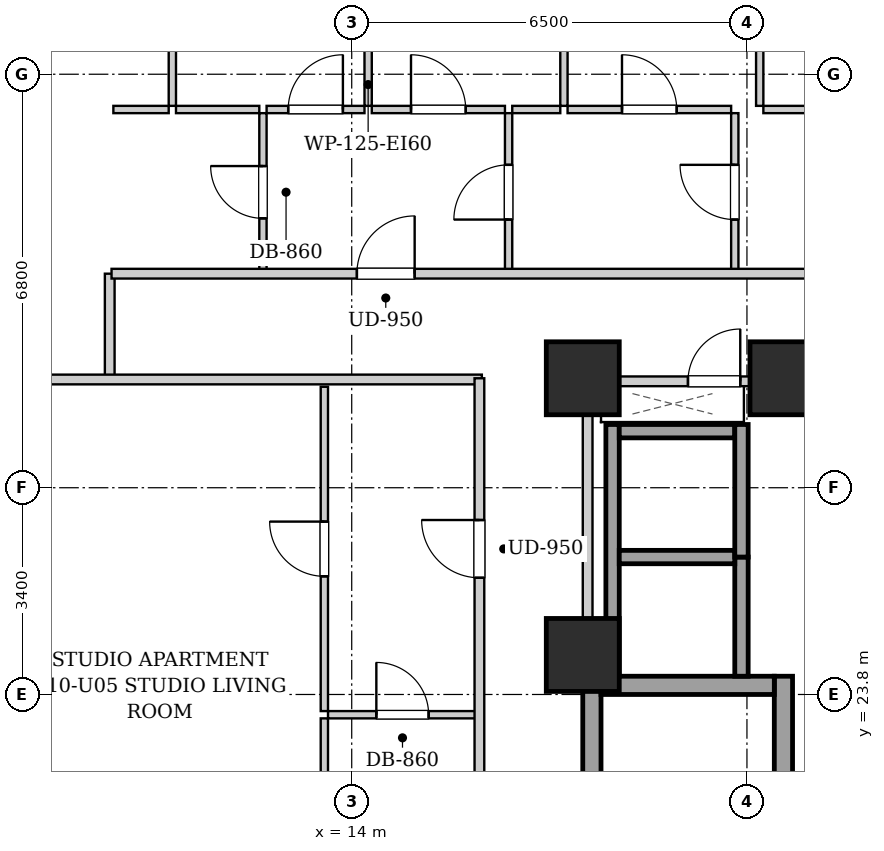
"""IFC4 building model, lengths in metres.
Left out: names, types, materials, properties, quantities, classifications, styles, units other than length and angle.
Written with IfcOpenShell. Run it as: python <this file> out.ifc"""

import sys

from ifc_helpers import new_model, si_unit, direction, frame, frame_2d, origin, origin_2d, place, context, subcontext, project, spatial, rectangle, extrude, element, fill, save


model = new_model("IFC4")
c1 = context("Model", 3, precision=1e-05, world=origin(), true_north=direction((0.0, 1.0)))
c2 = subcontext(c1, "Body", "Model", "MODEL_VIEW")
j1 = project(units=[si_unit("LENGTHUNIT", "METRE"), si_unit("PLANEANGLEUNIT", "RADIAN")], contexts=[c1])
p1 = place(None, origin())
s1 = spatial("IfcSite", under=j1, at=p1, CompositionType="ELEMENT")
p2 = place(p1, origin())
s2 = spatial("IfcBuilding", under=s1, at=p2, CompositionType="ELEMENT")
p3 = place(p2, frame((0.0, 0.0, 41.8)))
s3 = spatial("IfcBuildingStorey", under=s2, at=p3, CompositionType="ELEMENT", Elevation=41.8)
for number, where, z_axis, x_axis in (
    (1, (17.8, 29.0, 0.0), (0.0, 0.0, 1.0), (1.0, 0.0, 0.0)),
    (2, (21.15, 29.0, 0.0), (0.0, 0.0, 1.0), (1.0, 0.0, 0.0)),
    (3, (17.8, 24.45, 0.0), (0.0, 0.0, 1.0), (1.0, 0.0, 0.0)),
):
    element("IfcColumn", number, at=place(p3, frame(where, z_axis=z_axis, x_axis=x_axis)), inside=s3, PredefinedType="COLUMN", context=c2, shape_type="SweptSolid", body=[
        extrude(rectangle(XDim=1.2, YDim=1.2, at=origin_2d()), origin(), (0.0, 0.0, 1.0), 3.2),
    ])
for number, where, z_axis, x_axis in (
    (4, (17.95, 15.1, 0.0), (0.0, 0.0, 1.0), (0.0, 1.0, 0.0)),
    (5, (21.1, 15.1, 0.0), (0.0, 0.0, 1.0), (0.0, 1.0, 0.0)),
):
    element("IfcWall", number, at=place(p3, frame(where, z_axis=z_axis, x_axis=x_axis)), inside=s3, PredefinedType="SHEAR", context=c2, shape_type="SweptSolid", body=[
        extrude(rectangle(XDim=9.0, YDim=0.3, at=frame_2d((4.5, 0.0))), origin(), (0.0, 0.0, 1.0), 2.94),
    ])
p4 = place(p3, frame((18.1, 23.95, 0.0), z_axis=(0.0, 0.0, 1.0), x_axis=(1.0, 0.0, 0.0)))
e6 = element("IfcWall", 6, at=p4, inside=s3, PredefinedType="SHEAR", context=c2, shape_type="SweptSolid", body=[
    extrude(rectangle(XDim=2.85, YDim=0.3, at=frame_2d((1.425, 0.0))), origin(), (0.0, 0.0, 1.0), 2.94),
])
p5 = place(p3, frame((18.29, 24.1, 0.0), z_axis=(0.0, 0.0, 1.0), x_axis=(0.0, 1.0, 0.0)))
e7 = element("IfcWall", 7, at=p5, inside=s3, PredefinedType="SHEAR", context=c2, shape_type="SweptSolid", body=[
    extrude(rectangle(XDim=4.14, YDim=0.22, at=frame_2d((2.07, 0.0))), origin(), (0.0, 0.0, 1.0), 2.94),
])
p6 = place(p3, frame((20.41, 24.1, 0.0), z_axis=(0.0, 0.0, 1.0), x_axis=(0.0, 1.0, 0.0)))
e8 = element("IfcWall", 8, at=p6, inside=s3, PredefinedType="SHEAR", context=c2, shape_type="SweptSolid", body=[
    extrude(rectangle(XDim=1.96, YDim=0.22, at=frame_2d((0.98, 0.0))), origin(), (0.0, 0.0, 1.0), 2.94),
])
for number, where, z_axis, x_axis in (
    (9, (18.4, 26.06, 0.0), (0.0, 0.0, 1.0), (1.0, 0.0, 0.0)),
    (10, (18.4, 28.13, 0.0), (0.0, 0.0, 1.0), (1.0, 0.0, 0.0)),
):
    element("IfcWall", number, at=place(p3, frame(where, z_axis=z_axis, x_axis=x_axis)), inside=s3, PredefinedType="SHEAR", context=c2, shape_type="SweptSolid", body=[
        extrude(rectangle(XDim=1.9, YDim=0.22, at=frame_2d((0.95, 0.0))), origin(), (0.0, 0.0, 1.0), 2.94),
    ])
p7 = place(p3, frame((20.41, 26.06, 0.0), z_axis=(0.0, 0.0, 1.0), x_axis=(0.0, 1.0, 0.0)))
e11 = element("IfcWall", 11, at=p7, inside=s3, PredefinedType="SHEAR", context=c2, shape_type="SweptSolid", body=[
    extrude(rectangle(XDim=2.18, YDim=0.22, at=frame_2d((1.09, 0.0))), origin(), (0.0, 0.0, 1.0), 2.94),
])
p8 = place(p3, frame((17.88, 24.12, 0.0), z_axis=(0.0, 0.0, 1.0), x_axis=(0.0, 1.0, 0.0)))
e12 = element("IfcWall", 12, at=p8, inside=s3, PredefinedType="PARTITIONING", context=c2, shape_type="SweptSolid", body=[
    extrude(rectangle(XDim=4.76, YDim=0.16, at=frame_2d((2.38, 0.0))), origin(), (0.0, 0.0, 1.0), 2.94),
])
p9 = place(p3, frame((17.96, 28.95, 0.0), z_axis=(0.0, 0.0, 1.0), x_axis=(1.0, 0.0, 0.0)))
e13 = element("IfcWall", 13, at=p9, inside=s3, PredefinedType="PARTITIONING", context=c2, shape_type="SweptSolid", body=[
    extrude(rectangle(XDim=4.29, YDim=0.16, at=frame_2d((2.145, 0.0))), origin(), (0.0, 0.0, 1.0), 2.155),
])
p10 = place(p9, frame((1.57, 0.0, 0.0)))
e14 = element("IfcOpeningElement", 14, at=p10, cuts=e13, PredefinedType="OPENING", context=c2, shape_type="SweptSolid", body=[
    extrude(rectangle(XDim=0.86, YDim=2.05, at=frame_2d((0.43, 1.025))), frame((0.0, 0.09, 0.0), z_axis=(0.0, -1.0, 0.0), x_axis=(1.0, 0.0, 0.0)), (0.0, 0.0, 1.0), 0.18),
])
p11 = place(p3, frame((10.02, 28.98, 0.0), z_axis=(0.0, 0.0, 1.0), x_axis=(0.0, 1.0, 0.0)))
e15 = element("IfcWall", 15, at=p11, inside=s3, PredefinedType="PARTITIONING", context=c2, shape_type="SweptSolid", body=[
    extrude(rectangle(XDim=1.74, YDim=0.16, at=frame_2d((0.87, 0.0))), origin(), (0.0, 0.0, 1.0), 2.94),
])
p12 = place(p3, frame((7.78, 28.98, 0.0), z_axis=(0.0, 0.0, 1.0), x_axis=(1.0, 0.0, 0.0)))
e16 = element("IfcWall", 16, at=p12, inside=s3, PredefinedType="PARTITIONING", context=c2, shape_type="SweptSolid", body=[
    extrude(rectangle(XDim=8.36, YDim=0.16, at=frame_2d((4.18, 0.0))), origin(), (0.0, 0.0, 1.0), 2.155),
])
p13 = place(p3, frame((12.54, 30.76, 0.0), z_axis=(0.0, 0.0, 1.0), x_axis=(0.0, 1.0, 0.0)))
e17 = element("IfcWall", 17, at=p13, inside=s3, PredefinedType="PARTITIONING", context=c2, shape_type="SweptSolid", body=[
    extrude(rectangle(XDim=2.6, YDim=0.12, at=frame_2d((1.3, 0.0))), origin(), (0.0, 0.0, 1.0), 2.94),
])
p14 = place(p13, frame((0.87, 0.0, 0.0)))
e18 = element("IfcOpeningElement", 18, at=p14, cuts=e17, PredefinedType="OPENING", context=c2, shape_type="SweptSolid", body=[
    extrude(rectangle(XDim=0.86, YDim=2.05, at=frame_2d((0.43, 1.025))), frame((0.0, 0.07, 0.0), z_axis=(0.0, -1.0, 0.0), x_axis=(1.0, 0.0, 0.0)), (0.0, 0.0, 1.0), 0.14),
])
p15 = place(p3, frame((10.08, 33.42, 0.0), z_axis=(0.0, 0.0, 1.0), x_axis=(1.0, 0.0, 0.0)))
e19 = element("IfcWall", 19, at=p15, inside=s3, PredefinedType="PARTITIONING", context=c2, shape_type="SweptSolid", body=[
    extrude(rectangle(XDim=0.91, YDim=0.12, at=frame_2d((0.455, 0.0))), origin(), (0.0, 0.0, 1.0), 2.94),
])
p16 = place(p3, frame((11.11, 33.42, 0.0), z_axis=(0.0, 0.0, 1.0), x_axis=(1.0, 0.0, 0.0)))
e20 = element("IfcWall", 20, at=p16, inside=s3, PredefinedType="PARTITIONING", context=c2, shape_type="SweptSolid", body=[
    extrude(rectangle(XDim=1.37, YDim=0.12, at=frame_2d((0.685, 0.0))), origin(), (0.0, 0.0, 1.0), 2.94),
])
p17 = place(p3, frame((16.58, 30.76, 0.0), z_axis=(0.0, 0.0, 1.0), x_axis=(0.0, 1.0, 0.0)))
e21 = element("IfcWall", 21, at=p17, inside=s3, PredefinedType="PARTITIONING", context=c2, shape_type="SweptSolid", body=[
    extrude(rectangle(XDim=2.6, YDim=0.12, at=frame_2d((1.3, 0.0))), origin(), (0.0, 0.0, 1.0), 2.94),
])
p18 = place(p17, frame((0.85, 0.0, 0.0)))
e22 = element("IfcOpeningElement", 22, at=p18, cuts=e21, PredefinedType="OPENING", context=c2, shape_type="SweptSolid", body=[
    extrude(rectangle(XDim=0.9, YDim=2.05, at=frame_2d((0.45, 1.025))), frame((0.0, 0.07, 0.0), z_axis=(0.0, -1.0, 0.0), x_axis=(1.0, 0.0, 0.0)), (0.0, 0.0, 1.0), 0.14),
])
p19 = place(p3, frame((12.6, 33.42, 0.0), z_axis=(0.0, 0.0, 1.0), x_axis=(1.0, 0.0, 0.0)))
e23 = element("IfcWall", 23, at=p19, inside=s3, PredefinedType="PARTITIONING", context=c2, shape_type="SweptSolid", body=[
    extrude(rectangle(XDim=1.61, YDim=0.12, at=frame_2d((0.805, 0.0))), origin(), (0.0, 0.0, 1.0), 2.94),
])
p20 = place(p19, frame((0.355, 0.0, 0.0)))
e24 = element("IfcOpeningElement", 24, at=p20, cuts=e23, PredefinedType="OPENING", context=c2, shape_type="SweptSolid", body=[
    extrude(rectangle(XDim=0.9, YDim=2.05, at=frame_2d((0.45, 1.025))), frame((0.0, 0.07, 0.0), z_axis=(0.0, -1.0, 0.0), x_axis=(1.0, 0.0, 0.0)), (0.0, 0.0, 1.0), 0.14),
])
p21 = place(p3, frame((14.33, 33.42, 0.0), z_axis=(0.0, 0.0, 1.0), x_axis=(1.0, 0.0, 0.0)))
e25 = element("IfcWall", 25, at=p21, inside=s3, PredefinedType="PARTITIONING", context=c2, shape_type="SweptSolid", body=[
    extrude(rectangle(XDim=2.19, YDim=0.12, at=frame_2d((1.095, 0.0))), origin(), (0.0, 0.0, 1.0), 2.94),
])
p22 = place(p21, frame((0.645, 0.0, 0.0)))
e26 = element("IfcOpeningElement", 26, at=p22, cuts=e25, PredefinedType="OPENING", context=c2, shape_type="SweptSolid", body=[
    extrude(rectangle(XDim=0.9, YDim=2.05, at=frame_2d((0.45, 1.025))), frame((0.0, 0.07, 0.0), z_axis=(0.0, -1.0, 0.0), x_axis=(1.0, 0.0, 0.0)), (0.0, 0.0, 1.0), 0.14),
])
p23 = place(p3, frame((20.3, 30.76, 0.0), z_axis=(0.0, 0.0, 1.0), x_axis=(0.0, 1.0, 0.0)))
e27 = element("IfcWall", 27, at=p23, inside=s3, PredefinedType="PARTITIONING", context=c2, shape_type="SweptSolid", body=[
    extrude(rectangle(XDim=2.6, YDim=0.12, at=frame_2d((1.3, 0.0))), origin(), (0.0, 0.0, 1.0), 2.94),
])
p24 = place(p23, frame((0.85, 0.0, 0.0)))
e28 = element("IfcOpeningElement", 28, at=p24, cuts=e27, PredefinedType="OPENING", context=c2, shape_type="SweptSolid", body=[
    extrude(rectangle(XDim=0.9, YDim=2.05, at=frame_2d((0.45, 1.025))), frame((0.0, 0.07, 0.0), z_axis=(0.0, -1.0, 0.0), x_axis=(1.0, 0.0, 0.0)), (0.0, 0.0, 1.0), 0.14),
])
p25 = place(p3, frame((16.64, 33.42, 0.0), z_axis=(0.0, 0.0, 1.0), x_axis=(1.0, 0.0, 0.0)))
e29 = element("IfcWall", 29, at=p25, inside=s3, PredefinedType="PARTITIONING", context=c2, shape_type="SweptSolid", body=[
    extrude(rectangle(XDim=0.79, YDim=0.12, at=frame_2d((0.395, 0.0))), origin(), (0.0, 0.0, 1.0), 2.94),
])
p26 = place(p3, frame((17.55, 33.42, 0.0), z_axis=(0.0, 0.0, 1.0), x_axis=(1.0, 0.0, 0.0)))
e30 = element("IfcWall", 30, at=p26, inside=s3, PredefinedType="PARTITIONING", context=c2, shape_type="SweptSolid", body=[
    extrude(rectangle(XDim=2.69, YDim=0.12, at=frame_2d((1.345, 0.0))), origin(), (0.0, 0.0, 1.0), 2.94),
])
p27 = place(p26, frame((0.895, 0.0, 0.0)))
e31 = element("IfcOpeningElement", 31, at=p27, cuts=e30, PredefinedType="OPENING", context=c2, shape_type="SweptSolid", body=[
    extrude(rectangle(XDim=0.9, YDim=2.05, at=frame_2d((0.45, 1.025))), frame((0.0, 0.07, 0.0), z_axis=(0.0, -1.0, 0.0), x_axis=(1.0, 0.0, 0.0)), (0.0, 0.0, 1.0), 0.14),
])
p28 = place(p3, frame((20.77, 33.42, 0.0), z_axis=(0.0, 0.0, 1.0), x_axis=(1.0, 0.0, 0.0)))
e32 = element("IfcWall", 32, at=p28, inside=s3, PredefinedType="PARTITIONING", context=c2, shape_type="SweptSolid", body=[
    extrude(rectangle(XDim=2.74, YDim=0.12, at=frame_2d((1.37, 0.0))), origin(), (0.0, 0.0, 1.0), 2.94),
])
p29 = place(p28, frame((0.92, 0.0, 0.0)))
e33 = element("IfcOpeningElement", 33, at=p29, cuts=e32, PredefinedType="OPENING", context=c2, shape_type="SweptSolid", body=[
    extrude(rectangle(XDim=0.9, YDim=2.05, at=frame_2d((0.45, 1.025))), frame((0.0, 0.07, 0.0), z_axis=(0.0, -1.0, 0.0), x_axis=(1.0, 0.0, 0.0)), (0.0, 0.0, 1.0), 0.14),
])
p30 = place(p3, frame((11.05, 33.48, 0.0), z_axis=(0.0, 0.0, 1.0), x_axis=(0.0, 1.0, 0.0)))
e34 = element("IfcWall", 34, at=p30, inside=s3, PredefinedType="PARTITIONING", context=c2, shape_type="SweptSolid", body=[
    extrude(rectangle(XDim=13.84, YDim=0.12, at=frame_2d((6.92, 0.0))), origin(), (0.0, 0.0, 1.0), 2.94),
])
p31 = place(p30, frame((6.455, 0.0, 0.0)))
e35 = element("IfcOpeningElement", 35, at=p31, cuts=e34, PredefinedType="OPENING", context=c2, shape_type="SweptSolid", body=[
    extrude(rectangle(XDim=0.9, YDim=2.05, at=frame_2d((0.45, 1.025))), frame((0.0, 0.07, 0.0), z_axis=(0.0, -1.0, 0.0), x_axis=(1.0, 0.0, 0.0)), (0.0, 0.0, 1.0), 0.14),
])
p32 = place(p3, frame((14.27, 33.48, 0.0), z_axis=(0.0, 0.0, 1.0), x_axis=(0.0, 1.0, 0.0)))
e36 = element("IfcWall", 36, at=p32, inside=s3, PredefinedType="PARTITIONING", context=c2, shape_type="SweptSolid", body=[
    extrude(rectangle(XDim=13.84, YDim=0.12, at=frame_2d((6.92, 0.0))), origin(), (0.0, 0.0, 1.0), 2.94),
])
p33 = place(p32, frame((6.455, 0.0, 0.0)))
e37 = element("IfcOpeningElement", 37, at=p33, cuts=e36, PredefinedType="OPENING", context=c2, shape_type="SweptSolid", body=[
    extrude(rectangle(XDim=0.9, YDim=2.05, at=frame_2d((0.45, 1.025))), frame((0.0, 0.07, 0.0), z_axis=(0.0, -1.0, 0.0), x_axis=(1.0, 0.0, 0.0)), (0.0, 0.0, 1.0), 0.14),
])
p34 = place(p3, frame((17.49, 33.48, 0.0), z_axis=(0.0, 0.0, 1.0), x_axis=(0.0, 1.0, 0.0)))
e38 = element("IfcWall", 38, at=p34, inside=s3, PredefinedType="PARTITIONING", context=c2, shape_type="SweptSolid", body=[
    extrude(rectangle(XDim=13.84, YDim=0.12, at=frame_2d((6.92, 0.0))), origin(), (0.0, 0.0, 1.0), 2.94),
])
p35 = place(p34, frame((6.455, 0.0, 0.0)))
e39 = element("IfcOpeningElement", 39, at=p35, cuts=e38, PredefinedType="OPENING", context=c2, shape_type="SweptSolid", body=[
    extrude(rectangle(XDim=0.9, YDim=2.05, at=frame_2d((0.45, 1.025))), frame((0.0, 0.07, 0.0), z_axis=(0.0, -1.0, 0.0), x_axis=(1.0, 0.0, 0.0)), (0.0, 0.0, 1.0), 0.14),
])
p36 = place(p3, frame((20.71, 33.48, 0.0), z_axis=(0.0, 0.0, 1.0), x_axis=(0.0, 1.0, 0.0)))
e40 = element("IfcWall", 40, at=p36, inside=s3, PredefinedType="PARTITIONING", context=c2, shape_type="SweptSolid", body=[
    extrude(rectangle(XDim=13.84, YDim=0.12, at=frame_2d((6.92, 0.0))), origin(), (0.0, 0.0, 1.0), 2.94),
])
p37 = place(p36, frame((6.455, 0.0, 0.0)))
e41 = element("IfcOpeningElement", 41, at=p37, cuts=e40, PredefinedType="OPENING", context=c2, shape_type="SweptSolid", body=[
    extrude(rectangle(XDim=0.9, YDim=2.05, at=frame_2d((0.45, 1.025))), frame((0.0, 0.07, 0.0), z_axis=(0.0, -1.0, 0.0), x_axis=(1.0, 0.0, 0.0)), (0.0, 0.0, 1.0), 0.14),
])
p38 = place(p3, frame((13.61, 23.467, 0.0), z_axis=(0.0, 0.0, 1.0), x_axis=(1.0, 0.0, 0.0)))
e42 = element("IfcWall", 42, at=p38, inside=s3, PredefinedType="PARTITIONING", context=c2, shape_type="SweptSolid", body=[
    extrude(rectangle(XDim=2.45, YDim=0.12, at=frame_2d((1.225, 0.0))), origin(), (0.0, 0.0, 1.0), 2.94),
])
p39 = place(p38, frame((0.795, 0.0, 0.0)))
e43 = element("IfcOpeningElement", 43, at=p39, cuts=e42, PredefinedType="OPENING", context=c2, shape_type="SweptSolid", body=[
    extrude(rectangle(XDim=0.86, YDim=2.05, at=frame_2d((0.43, 1.025))), frame((0.0, 0.07, 0.0), z_axis=(0.0, -1.0, 0.0), x_axis=(1.0, 0.0, 0.0)), (0.0, 0.0, 1.0), 0.14),
])
p40 = place(p3, frame((13.55, 21.286, 0.0), z_axis=(0.0, 0.0, 1.0), x_axis=(0.0, 1.0, 0.0)))
e44 = element("IfcWall", 44, at=p40, inside=s3, PredefinedType="PARTITIONING", context=c2, shape_type="SweptSolid", body=[
    extrude(rectangle(XDim=2.121, YDim=0.12, at=frame_2d((1.061, 0.0))), origin(), (0.0, 0.0, 1.0), 2.94),
])
p41 = place(p3, frame((13.55, 23.527, 0.0), z_axis=(0.0, 0.0, 1.0), x_axis=(0.0, 1.0, 0.0)))
e45 = element("IfcWall", 45, at=p41, inside=s3, PredefinedType="PARTITIONING", context=c2, shape_type="SweptSolid", body=[
    extrude(rectangle(XDim=5.333, YDim=0.12, at=frame_2d((2.667, 0.0))), origin(), (0.0, 0.0, 1.0), 2.94),
])
p42 = place(p41, frame((2.216, 0.0, 0.0)))
e46 = element("IfcOpeningElement", 46, at=p42, cuts=e45, PredefinedType="OPENING", context=c2, shape_type="SweptSolid", body=[
    extrude(rectangle(XDim=0.9, YDim=2.05, at=frame_2d((0.45, 1.025))), frame((0.0, 0.07, 0.0), z_axis=(0.0, -1.0, 0.0), x_axis=(1.0, 0.0, 0.0)), (0.0, 0.0, 1.0), 0.14),
])
p43 = place(p3, frame((10.05, 30.72, 0.0), z_axis=(0.0, 0.0, 1.0), x_axis=(1.0, 0.0, 0.0)))
e47 = element("IfcWall", 47, at=p43, inside=s3, PredefinedType="PARTITIONING", context=c2, shape_type="SweptSolid", body=[
    extrude(rectangle(XDim=33.9, YDim=0.16, at=frame_2d((16.95, 0.0))), origin(), (0.0, 0.0, 1.0), 2.94),
])
p44 = place(p43, frame((4.035, 0.0, 0.0)))
e48 = element("IfcOpeningElement", 48, at=p44, cuts=e47, PredefinedType="OPENING", context=c2, shape_type="SweptSolid", body=[
    extrude(rectangle(XDim=0.95, YDim=2.1, at=frame_2d((0.475, 1.05))), frame((0.0, 0.09, 0.0), z_axis=(0.0, -1.0, 0.0), x_axis=(1.0, 0.0, 0.0)), (0.0, 0.0, 1.0), 0.18),
])
p45 = place(p3, frame((16.1, 15.07, 0.0), z_axis=(0.0, 0.0, 1.0), x_axis=(0.0, 1.0, 0.0)))
e49 = element("IfcWall", 49, at=p45, inside=s3, PredefinedType="PARTITIONING", context=c2, shape_type="SweptSolid", body=[
    extrude(rectangle(XDim=13.93, YDim=0.16, at=frame_2d((6.965, 0.0))), origin(), (0.0, 0.0, 1.0), 2.94),
])
p46 = place(p45, frame((3.608, 0.0, 0.0)))
e50 = element("IfcOpeningElement", 50, at=p46, cuts=e49, PredefinedType="OPENING", context=c2, shape_type="SweptSolid", body=[
    extrude(rectangle(XDim=0.95, YDim=2.1, at=frame_2d((0.475, 1.05))), frame((0.0, 0.09, 0.0), z_axis=(0.0, -1.0, 0.0), x_axis=(1.0, 0.0, 0.0)), (0.0, 0.0, 1.0), 0.18),
])
p47 = place(p45, frame((10.649, 0.0, 0.0)))
e51 = element("IfcOpeningElement", 51, at=p47, cuts=e49, PredefinedType="OPENING", context=c2, shape_type="SweptSolid", body=[
    extrude(rectangle(XDim=0.95, YDim=2.1, at=frame_2d((0.475, 1.05))), frame((0.0, 0.09, 0.0), z_axis=(0.0, -1.0, 0.0), x_axis=(1.0, 0.0, 0.0)), (0.0, 0.0, 1.0), 0.18),
])
p48 = place(p10, origin())
e52 = element("IfcDoor", 52, at=p48, inside=s3, OperationType="SINGLE_SWING_RIGHT", PredefinedType="DOOR", context=c2, shape_type="SweptSolid", body=[
    extrude(rectangle(XDim=0.86, YDim=2.05, at=frame_2d((0.43, 1.025))), frame((0.0, 0.025, 0.0), z_axis=(0.0, -1.0, 0.0), x_axis=(1.0, 0.0, 0.0)), (0.0, 0.0, 1.0), 0.05),
])
fill(e14, e52)
p49 = place(p14, origin())
e53 = element("IfcDoor", 53, at=p49, inside=s3, OperationType="SINGLE_SWING_RIGHT", PredefinedType="DOOR", context=c2, shape_type="SweptSolid", body=[
    extrude(rectangle(XDim=0.86, YDim=2.05, at=frame_2d((0.43, 1.025))), frame((0.0, 0.025, 0.0), z_axis=(0.0, -1.0, 0.0), x_axis=(1.0, 0.0, 0.0)), (0.0, 0.0, 1.0), 0.05),
])
fill(e18, e53)
p50 = place(p18, origin())
e54 = element("IfcDoor", 54, at=p50, inside=s3, OperationType="SINGLE_SWING_LEFT", PredefinedType="DOOR", context=c2, shape_type="SweptSolid", body=[
    extrude(rectangle(XDim=0.9, YDim=2.05, at=frame_2d((0.45, 1.025))), frame((0.0, 0.025, 0.0), z_axis=(0.0, -1.0, 0.0), x_axis=(1.0, 0.0, 0.0)), (0.0, 0.0, 1.0), 0.05),
])
fill(e22, e54)
p51 = place(p20, origin())
e55 = element("IfcDoor", 55, at=p51, inside=s3, OperationType="SINGLE_SWING_RIGHT", PredefinedType="DOOR", context=c2, shape_type="SweptSolid", body=[
    extrude(rectangle(XDim=0.9, YDim=2.05, at=frame_2d((0.45, 1.025))), frame((0.0, 0.025, 0.0), z_axis=(0.0, -1.0, 0.0), x_axis=(1.0, 0.0, 0.0)), (0.0, 0.0, 1.0), 0.05),
])
fill(e24, e55)
p52 = place(p22, origin())
e56 = element("IfcDoor", 56, at=p52, inside=s3, OperationType="SINGLE_SWING_LEFT", PredefinedType="DOOR", context=c2, shape_type="SweptSolid", body=[
    extrude(rectangle(XDim=0.9, YDim=2.05, at=frame_2d((0.45, 1.025))), frame((0.0, 0.025, 0.0), z_axis=(0.0, -1.0, 0.0), x_axis=(1.0, 0.0, 0.0)), (0.0, 0.0, 1.0), 0.05),
])
fill(e26, e56)
p53 = place(p24, origin())
e57 = element("IfcDoor", 57, at=p53, inside=s3, OperationType="SINGLE_SWING_RIGHT", PredefinedType="DOOR", context=c2, shape_type="SweptSolid", body=[
    extrude(rectangle(XDim=0.9, YDim=2.05, at=frame_2d((0.45, 1.025))), frame((0.0, 0.025, 0.0), z_axis=(0.0, -1.0, 0.0), x_axis=(1.0, 0.0, 0.0)), (0.0, 0.0, 1.0), 0.05),
])
fill(e28, e57)
p54 = place(p27, origin())
e58 = element("IfcDoor", 58, at=p54, inside=s3, OperationType="SINGLE_SWING_LEFT", PredefinedType="DOOR", context=c2, shape_type="SweptSolid", body=[
    extrude(rectangle(XDim=0.9, YDim=2.05, at=frame_2d((0.45, 1.025))), frame((0.0, 0.025, 0.0), z_axis=(0.0, -1.0, 0.0), x_axis=(1.0, 0.0, 0.0)), (0.0, 0.0, 1.0), 0.05),
])
fill(e31, e58)
p55 = place(p39, origin())
e59 = element("IfcDoor", 59, at=p55, inside=s3, OperationType="SINGLE_SWING_LEFT", PredefinedType="DOOR", context=c2, shape_type="SweptSolid", body=[
    extrude(rectangle(XDim=0.86, YDim=2.05, at=frame_2d((0.43, 1.025))), frame((0.0, 0.025, 0.0), z_axis=(0.0, -1.0, 0.0), x_axis=(1.0, 0.0, 0.0)), (0.0, 0.0, 1.0), 0.05),
])
fill(e43, e59)
p56 = place(p42, origin())
e60 = element("IfcDoor", 60, at=p56, inside=s3, OperationType="SINGLE_SWING_RIGHT", PredefinedType="DOOR", context=c2, shape_type="SweptSolid", body=[
    extrude(rectangle(XDim=0.9, YDim=2.05, at=frame_2d((0.45, 1.025))), frame((0.0, 0.025, 0.0), z_axis=(0.0, -1.0, 0.0), x_axis=(1.0, 0.0, 0.0)), (0.0, 0.0, 1.0), 0.05),
])
fill(e46, e60)
p57 = place(p44, origin())
e61 = element("IfcDoor", 61, at=p57, inside=s3, OperationType="SINGLE_SWING_RIGHT", PredefinedType="DOOR", context=c2, shape_type="SweptSolid", body=[
    extrude(rectangle(XDim=0.95, YDim=2.1, at=frame_2d((0.475, 1.05))), frame((0.0, 0.025, 0.0), z_axis=(0.0, -1.0, 0.0), x_axis=(1.0, 0.0, 0.0)), (0.0, 0.0, 1.0), 0.05),
])
fill(e48, e61)
p58 = place(p47, origin())
e62 = element("IfcDoor", 62, at=p58, inside=s3, OperationType="SINGLE_SWING_RIGHT", PredefinedType="DOOR", context=c2, shape_type="SweptSolid", body=[
    extrude(rectangle(XDim=0.95, YDim=2.1, at=frame_2d((0.475, 1.05))), frame((0.0, 0.025, 0.0), z_axis=(0.0, -1.0, 0.0), x_axis=(1.0, 0.0, 0.0)), (0.0, 0.0, 1.0), 0.05),
])
fill(e51, e62)
save(model, sys.argv[1])
